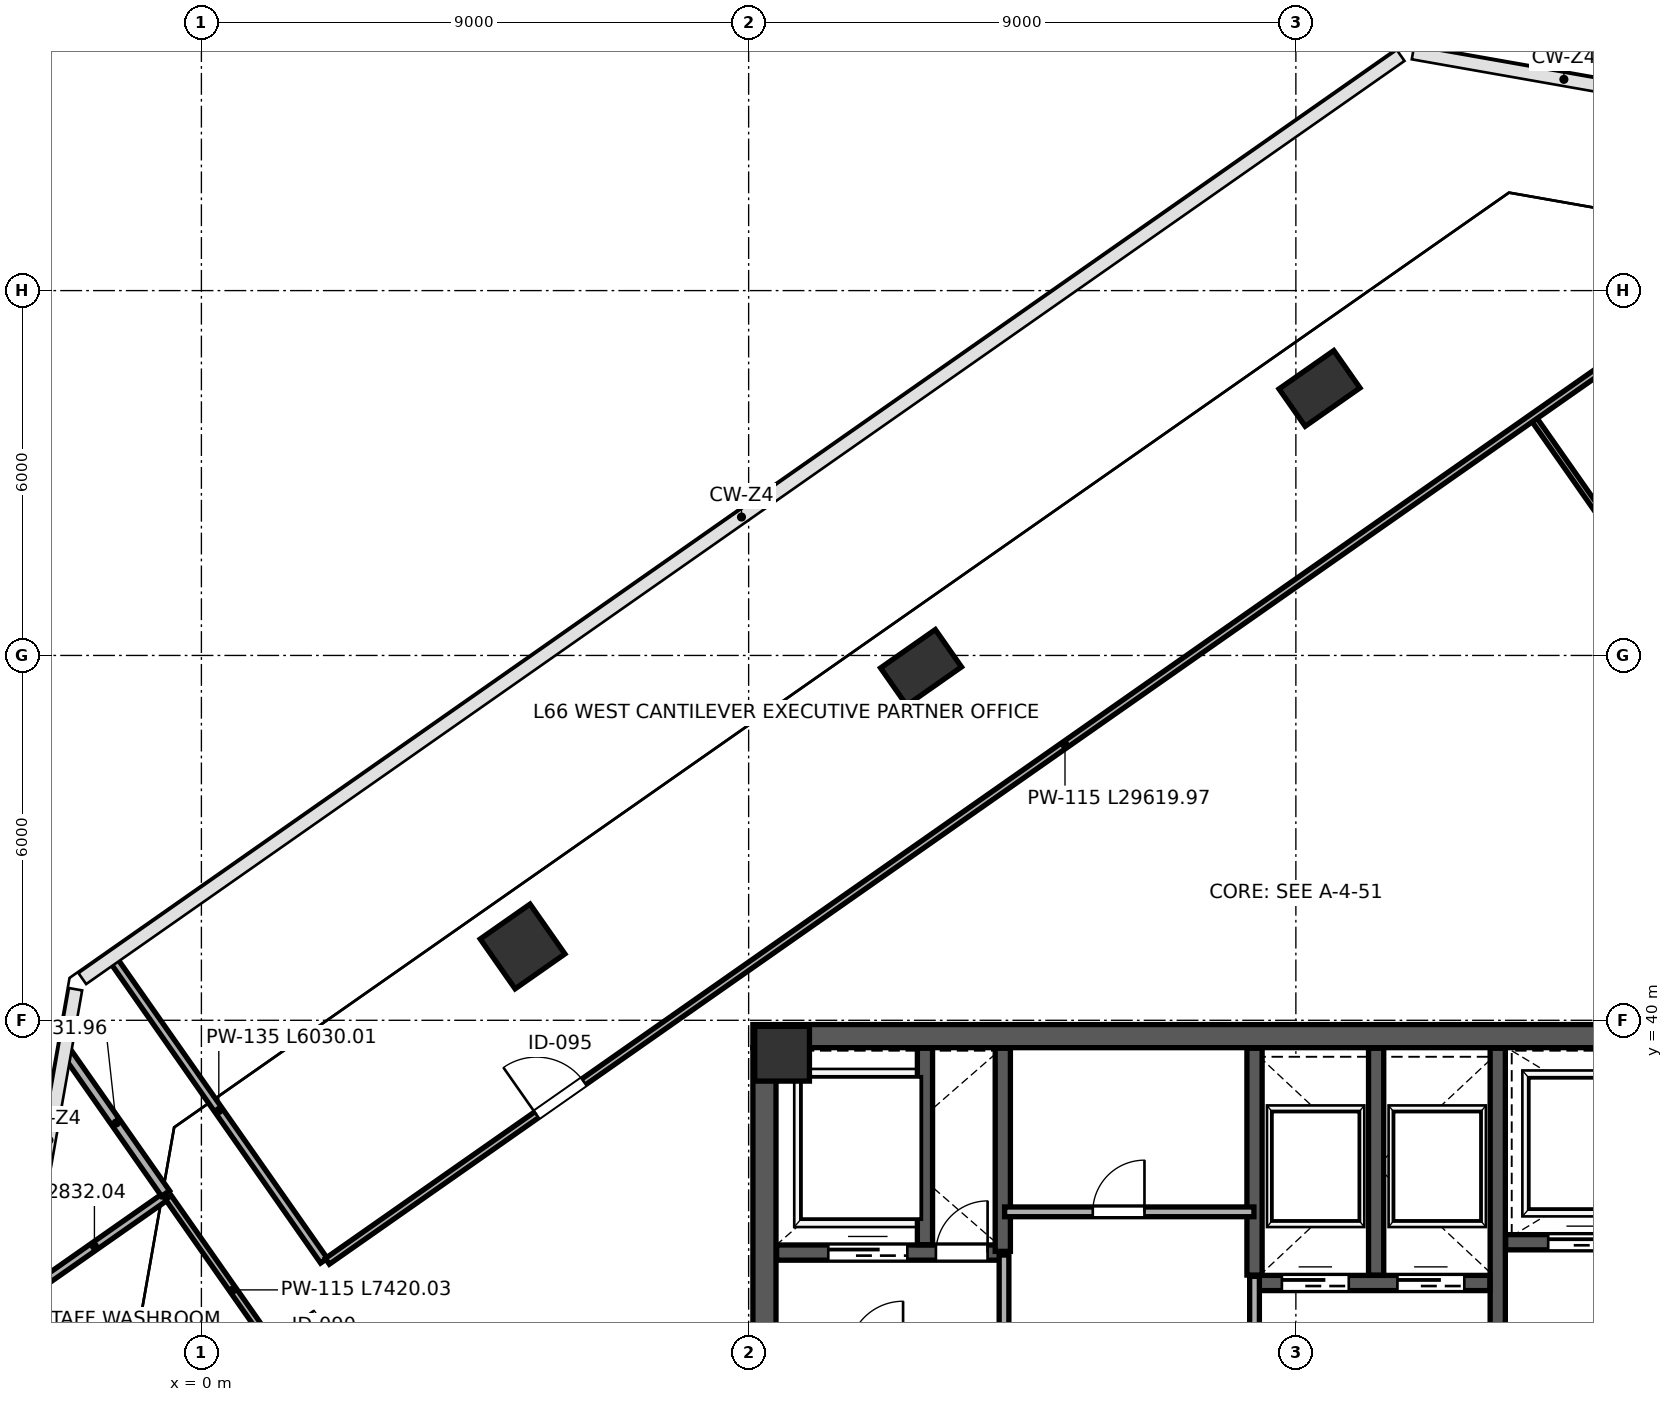
"""IFC4 building model, lengths in metres.
Left out: names, types, materials, properties, quantities, classifications, styles, units other than length and angle.
Written with IfcOpenShell. Run it as: python <this file> out.ifc"""

import sys

from ifc_helpers import new_model, si_unit, direction, frame, frame_2d, origin, origin_2d, place, context, subcontext, project, spatial, rectangle, extrude, source, transform, mapped, element, fill, save


model = new_model("IFC4")
c1 = context("Model", 3, precision=1e-05, world=origin(), true_north=direction((0.0, 1.0)))
c2 = subcontext(c1, "Body", "Model", "MODEL_VIEW")
j1 = project(units=[si_unit("LENGTHUNIT", "METRE"), si_unit("PLANEANGLEUNIT", "RADIAN")], contexts=[c1])
p1 = place(None, origin())
s1 = spatial("IfcSite", under=j1, at=p1, CompositionType="ELEMENT")
p2 = place(p1, origin())
s2 = spatial("IfcBuilding", under=s1, at=p2, CompositionType="ELEMENT")
p3 = place(p2, frame((0.0, 0.0, 293.8)))
s3 = spatial("IfcBuildingStorey", under=s2, at=p3, CompositionType="ELEMENT", Elevation=293.8)
m1 = source(origin(), c2, "Body", "SweptSolid", [
    extrude(rectangle(XDim=0.9, YDim=0.9, at=origin_2d()), origin(), (0.0, 0.0, 1.0), 4.999),
])
p4 = place(p3, frame((9.55, 39.45, 0.001), z_axis=(0.0, 0.0, 1.0), x_axis=(1.0, 0.0, 0.0)))
e1 = element("IfcColumn", 1, at=p4, inside=s3, PredefinedType="COLUMN", context=c2, shape_type="MappedRepresentation", body=[
    mapped(m1, transform((0.0, 0.0, 0.0), scale=1.0)),
])
m2 = source(origin(), c2, "Body", "SweptSolid", [
    extrude(rectangle(XDim=1.0, YDim=1.0, at=origin_2d()), origin(), (0.0, 0.0, 1.0), 4.999),
])
p5 = place(p3, frame((5.282, 41.214, 0.001), z_axis=(0.0, 0.0, 1.0), x_axis=(-0.573576436351, 0.819152044289, 0.0)))
e2 = element("IfcColumn", 2, at=p5, inside=s3, PredefinedType="COLUMN", context=c2, shape_type="MappedRepresentation", body=[
    mapped(m2, transform((0.0, 0.0, 0.0), scale=1.0)),
])
m3 = source(origin(), c2, "Body", "SweptSolid", [
    extrude(rectangle(XDim=0.75, YDim=1.1, at=origin_2d()), origin(), (0.0, 0.0, 1.0), 4.999),
])
for number, where, z_axis, x_axis in (
    (3, (11.835, 45.803, 0.001), (0.0, 0.0, 1.0), (-0.574, 0.819, 0.0)),
    (4, (18.388, 50.391, 0.001), (0.0, 0.0, 1.0), (-0.574, 0.819, 0.0)),
):
    element("IfcColumn", number, at=place(p3, frame(where, z_axis=z_axis, x_axis=x_axis)), inside=s3, PredefinedType="PILASTER", context=c2, shape_type="MappedRepresentation", body=[
        mapped(m3, transform((0.0, 0.0, 0.0), scale=1.0)),
    ])
p6 = place(p3, frame((9.26, 24.45, 0.0), z_axis=(0.0, 0.0, 1.0), x_axis=(0.0, 1.0, 0.0)))
e5 = element("IfcWall", 5, at=p6, inside=s3, PredefinedType="SHEAR", context=c2, shape_type="SweptSolid", body=[
    extrude(rectangle(XDim=15.1, YDim=0.38, at=frame_2d((7.55, 0.0))), origin(), (0.0, 0.0, 1.0), 4.76),
])
p7 = place(p6, frame((8.7, 0.0, 0.0)))
e6 = element("IfcOpeningElement", 6, at=p7, cuts=e5, PredefinedType="OPENING", context=c2, shape_type="SweptSolid", body=[
    extrude(rectangle(XDim=1.15, YDim=2.2, at=frame_2d((0.575, 1.1))), frame((0.0, 0.2, 0.0), z_axis=(0.0, -1.0, 0.0), x_axis=(1.0, 0.0, 0.0)), (0.0, 0.0, 1.0), 0.4),
])
p8 = place(p3, frame((9.07, 39.74, 0.0), z_axis=(0.0, 0.0, 1.0), x_axis=(1.0, 0.0, 0.0)))
e7 = element("IfcWall", 7, at=p8, inside=s3, PredefinedType="SHEAR", context=c2, shape_type="SweptSolid", body=[
    extrude(rectangle(XDim=17.86, YDim=0.38, at=frame_2d((8.93, 0.0))), origin(), (0.0, 0.0, 1.0), 4.76),
])
p9 = place(p3, frame((21.32, 32.12, 0.0), z_axis=(0.0, 0.0, 1.0), x_axis=(0.0, 1.0, 0.0)))
e8 = element("IfcWall", 8, at=p9, inside=s3, PredefinedType="SHEAR", context=c2, shape_type="SweptSolid", body=[
    extrude(rectangle(XDim=7.42, YDim=0.25, at=frame_2d((3.71, 0.0))), origin(), (0.0, 0.0, 1.0), 4.76),
])
p10 = place(p9, frame((1.4, 0.0, 0.0)))
e9 = element("IfcOpeningElement", 9, at=p10, cuts=e8, PredefinedType="OPENING", context=c2, shape_type="SweptSolid", body=[
    extrude(rectangle(XDim=1.15, YDim=2.2, at=frame_2d((0.575, 1.1))), frame((0.0, 0.135, 0.0), z_axis=(0.0, -1.0, 0.0), x_axis=(1.0, 0.0, 0.0)), (0.0, 0.0, 1.0), 0.27),
])
p11 = place(p3, frame((9.46, 36.18, 0.0), z_axis=(0.0, 0.0, 1.0), x_axis=(1.0, 0.0, 0.0)))
e10 = element("IfcWall", 10, at=p11, inside=s3, PredefinedType="SHEAR", context=c2, shape_type="SweptSolid", body=[
    extrude(rectangle(XDim=3.79, YDim=0.25, at=frame_2d((1.895, 0.0))), origin(), (0.0, 0.0, 1.0), 4.76),
])
p12 = place(p11, frame((2.62, 0.0, 0.0)))
e11 = element("IfcOpeningElement", 11, at=p12, cuts=e10, PredefinedType="OPENING", context=c2, shape_type="SweptSolid", body=[
    extrude(rectangle(XDim=0.85, YDim=2.1, at=frame_2d((0.425, 1.05))), frame((0.0, 0.135, 0.0), z_axis=(0.0, -1.0, 0.0), x_axis=(1.0, 0.0, 0.0)), (0.0, 0.0, 1.0), 0.27),
])
p13 = place(p11, frame((0.85, 0.0, 0.0)))
e12 = element("IfcOpeningElement", 12, at=p13, cuts=e10, PredefinedType="OPENING", context=c2, shape_type="SweptSolid", body=[
    extrude(rectangle(XDim=1.3, YDim=2.25, at=frame_2d((0.65, 1.125))), frame((0.0, 0.135, 0.0), z_axis=(0.0, -1.0, 0.0), x_axis=(1.0, 0.0, 0.0)), (0.0, 0.0, 1.0), 0.27),
])
p14 = place(p3, frame((11.9, 36.31, 0.0), z_axis=(0.0, 0.0, 1.0), x_axis=(0.0, 1.0, 0.0)))
e13 = element("IfcWall", 13, at=p14, inside=s3, PredefinedType="SHEAR", context=c2, shape_type="SweptSolid", body=[
    extrude(rectangle(XDim=3.23, YDim=0.25, at=frame_2d((1.615, 0.0))), origin(), (0.0, 0.0, 1.0), 4.76),
])
p15 = place(p3, frame((21.45, 36.35, 0.0), z_axis=(0.0, 0.0, 1.0), x_axis=(1.0, 0.0, 0.0)))
e14 = element("IfcWall", 14, at=p15, inside=s3, PredefinedType="SHEAR", context=c2, shape_type="SweptSolid", body=[
    extrude(rectangle(XDim=5.09, YDim=0.25, at=frame_2d((2.545, 0.0))), origin(), (0.0, 0.0, 1.0), 4.76),
])
p16 = place(p15, frame((0.7, 0.0, 0.0)))
e15 = element("IfcOpeningElement", 15, at=p16, cuts=e14, PredefinedType="OPENING", context=c2, shape_type="SweptSolid", body=[
    extrude(rectangle(XDim=1.2, YDim=2.2, at=frame_2d((0.6, 1.1))), frame((0.0, 0.135, 0.0), z_axis=(0.0, -1.0, 0.0), x_axis=(1.0, 0.0, 0.0)), (0.0, 0.0, 1.0), 0.27),
])
p17 = place(p15, frame((3.25, 0.0, 0.0)))
e16 = element("IfcOpeningElement", 16, at=p17, cuts=e14, PredefinedType="OPENING", context=c2, shape_type="SweptSolid", body=[
    extrude(rectangle(XDim=1.2, YDim=2.2, at=frame_2d((0.6, 1.1))), frame((0.0, 0.135, 0.0), z_axis=(0.0, -1.0, 0.0), x_axis=(1.0, 0.0, 0.0)), (0.0, 0.0, 1.0), 0.27),
])
p18 = place(p3, frame((13.18, 36.2, 0.0), z_axis=(0.0, 0.0, 1.0), x_axis=(0.0, 1.0, 0.0)))
e17 = element("IfcWall", 17, at=p18, inside=s3, PredefinedType="SHEAR", context=c2, shape_type="SweptSolid", body=[
    extrude(rectangle(XDim=3.34, YDim=0.25, at=frame_2d((1.67, 0.0))), origin(), (0.0, 0.0, 1.0), 4.76),
])
p19 = place(p3, frame((17.32, 35.68, 0.0), z_axis=(0.0, 0.0, 1.0), x_axis=(1.0, 0.0, 0.0)))
e18 = element("IfcWall", 18, at=p19, inside=s3, PredefinedType="SHEAR", context=c2, shape_type="SweptSolid", body=[
    extrude(rectangle(XDim=3.87, YDim=0.25, at=frame_2d((1.935, 0.0))), origin(), (0.0, 0.0, 1.0), 4.76),
])
p20 = place(p19, frame((0.45, 0.0, 0.0)))
e19 = element("IfcOpeningElement", 19, at=p20, cuts=e18, PredefinedType="OPENING", context=c2, shape_type="SweptSolid", body=[
    extrude(rectangle(XDim=1.1, YDim=2.2, at=frame_2d((0.55, 1.1))), frame((0.0, 0.135, 0.0), z_axis=(0.0, -1.0, 0.0), x_axis=(1.0, 0.0, 0.0)), (0.0, 0.0, 1.0), 0.27),
])
p21 = place(p19, frame((2.35, 0.0, 0.0)))
e20 = element("IfcOpeningElement", 20, at=p21, cuts=e18, PredefinedType="OPENING", context=c2, shape_type="SweptSolid", body=[
    extrude(rectangle(XDim=1.1, YDim=2.2, at=frame_2d((0.55, 1.1))), frame((0.0, 0.135, 0.0), z_axis=(0.0, -1.0, 0.0), x_axis=(1.0, 0.0, 0.0)), (0.0, 0.0, 1.0), 0.27),
])
for number, where, z_axis, x_axis in (
    (21, (17.32, 35.81, 0.0), (0.0, 0.0, 1.0), (0.0, 1.0, 0.0)),
    (22, (19.32, 35.81, 0.0), (0.0, 0.0, 1.0), (0.0, 1.0, 0.0)),
):
    element("IfcWall", number, at=place(p3, frame(where, z_axis=z_axis, x_axis=x_axis)), inside=s3, PredefinedType="SHEAR", context=c2, shape_type="SweptSolid", body=[
        extrude(rectangle(XDim=3.73, YDim=0.25, at=frame_2d((1.865, 0.0))), origin(), (0.0, 0.0, 1.0), 4.76),
    ])
p22 = place(p3, frame((13.2, 34.57, 0.0), z_axis=(0.0, 0.0, 1.0), x_axis=(0.0, 1.0, 0.0)))
e23 = element("IfcWall", 23, at=p22, inside=s3, PredefinedType="PARTITIONING", context=c2, shape_type="SweptSolid", body=[
    extrude(rectangle(XDim=1.57, YDim=0.16, at=frame_2d((0.785, 0.0))), origin(), (0.0, 0.0, 1.0), 4.76),
])
p23 = place(p3, frame((17.32, 33.86, 0.0), z_axis=(0.0, 0.0, 1.0), x_axis=(0.0, 1.0, 0.0)))
e24 = element("IfcWall", 24, at=p23, inside=s3, PredefinedType="PARTITIONING", context=c2, shape_type="SweptSolid", body=[
    extrude(rectangle(XDim=1.93, YDim=0.16, at=frame_2d((0.965, 0.0))), origin(), (0.0, 0.0, 1.0), 4.76),
])
p24 = place(p3, frame((13.21, 36.85, 0.0), z_axis=(0.0, 0.0, 1.0), x_axis=(1.0, 0.0, 0.0)))
e25 = element("IfcWall", 25, at=p24, inside=s3, PredefinedType="PARTITIONING", context=c2, shape_type="SweptSolid", body=[
    extrude(rectangle(XDim=4.1, YDim=0.16, at=frame_2d((2.05, 0.0))), origin(), (0.0, 0.0, 1.0), 4.76),
])
p25 = place(p24, frame((1.45, 0.0, 0.0)))
e26 = element("IfcOpeningElement", 26, at=p25, cuts=e25, PredefinedType="OPENING", context=c2, shape_type="SweptSolid", body=[
    extrude(rectangle(XDim=0.85, YDim=2.1, at=frame_2d((0.425, 1.05))), frame((0.0, 0.09, 0.0), z_axis=(0.0, -1.0, 0.0), x_axis=(1.0, 0.0, 0.0)), (0.0, 0.0, 1.0), 0.18),
])
p26 = place(p3, frame((-2.919, 35.471, 0.0), z_axis=(0.0, 0.0, 1.0), x_axis=(0.819098241059, 0.573653267657, 0.0)))
e27 = element("IfcWall", 27, at=p26, inside=s3, PredefinedType="PARTITIONING", context=c2, shape_type="SweptSolid", body=[
    extrude(rectangle(XDim=2.832, YDim=0.135, at=frame_2d((1.416, 0.0))), origin(), (0.0, 0.0, 1.0), 4.76),
])
p27 = place(p3, frame((-2.214, 39.471, 0.0), z_axis=(0.0, 0.0, 1.0), x_axis=(0.573653267657, -0.819098241059, 0.0)))
e28 = element("IfcWall", 28, at=p27, inside=s3, PredefinedType="PARTITIONING", context=c2, shape_type="SweptSolid", body=[
    extrude(rectangle(XDim=2.832, YDim=0.16, at=frame_2d((1.416, 0.0))), origin(), (0.0, 0.0, 1.0), 4.76),
])
p28 = place(p3, frame((-0.544, 37.086, 0.0), z_axis=(0.0, 0.0, 1.0), x_axis=(0.573568336404, -0.819157715873, 0.0)))
e29 = element("IfcWall", 29, at=p28, inside=s3, PredefinedType="PARTITIONING", context=c2, shape_type="SweptSolid", body=[
    extrude(rectangle(XDim=7.42, YDim=0.115, at=frame_2d((3.71, 0.0))), origin(), (0.0, 0.0, 1.0), 4.76),
])
p29 = place(p28, frame((2.9, 0.0, 0.0)))
e30 = element("IfcOpeningElement", 30, at=p29, cuts=e29, PredefinedType="OPENING", context=c2, shape_type="SweptSolid", body=[
    extrude(rectangle(XDim=0.9, YDim=2.15, at=frame_2d((0.45, 1.075))), frame((0.0, 0.067, 0.0), z_axis=(0.0, -1.0, 0.0), x_axis=(1.0, 0.0, 0.0)), (0.0, 0.0, 1.0), 0.135),
])
p30 = place(p28, frame((5.0, 0.0, 0.0)))
e31 = element("IfcOpeningElement", 31, at=p30, cuts=e29, PredefinedType="OPENING", context=c2, shape_type="SweptSolid", body=[
    extrude(rectangle(XDim=0.95, YDim=2.15, at=frame_2d((0.475, 1.075))), frame((0.0, 0.067, 0.0), z_axis=(0.0, -1.0, 0.0), x_axis=(1.0, 0.0, 0.0)), (0.0, 0.0, 1.0), 0.135),
])
p31 = place(p3, frame((21.918, 49.884, 0.0), z_axis=(0.0, 0.0, 1.0), x_axis=(0.57358495776, -0.819146077468, 0.0)))
e32 = element("IfcWall", 32, at=p31, inside=s3, PredefinedType="PARTITIONING", context=c2, shape_type="SweptSolid", body=[
    extrude(rectangle(XDim=25.79, YDim=0.1, at=frame_2d((12.895, 0.0))), origin(), (0.0, 0.0, 1.0), 4.76),
])
p32 = place(p31, frame((9.2, 0.0, 0.0)))
e33 = element("IfcOpeningElement", 33, at=p32, cuts=e32, PredefinedType="OPENING", context=c2, shape_type="SweptSolid", body=[
    extrude(rectangle(XDim=0.95, YDim=2.15, at=frame_2d((0.475, 1.075))), frame((0.0, 0.06, 0.0), z_axis=(0.0, -1.0, 0.0), x_axis=(1.0, 0.0, 0.0)), (0.0, 0.0, 1.0), 0.12),
])
p33 = place(p3, frame((-1.443, 40.985, 0.0), z_axis=(0.0, 0.0, 1.0), x_axis=(0.573587332855, -0.819144414367, 0.0)))
e34 = element("IfcWall", 34, at=p33, inside=s3, PredefinedType="PARTITIONING", context=c2, shape_type="SweptSolid", body=[
    extrude(rectangle(XDim=6.03, YDim=0.135, at=frame_2d((3.015, 0.0))), origin(), (0.0, 0.0, 1.0), 4.76),
])
p34 = place(p3, frame((2.071, 36.036, 0.0), z_axis=(0.0, 0.0, 1.0), x_axis=(0.819154854942, 0.573572422302, 0.0)))
e35 = element("IfcWall", 35, at=p34, inside=s3, PredefinedType="PARTITIONING", context=c2, shape_type="SweptSolid", body=[
    extrude(rectangle(XDim=29.62, YDim=0.115, at=frame_2d((14.81, 0.0))), origin(), (0.0, 0.0, 1.0), 4.76),
])
p35 = place(p34, frame((4.2, 0.0, 0.0)))
e36 = element("IfcOpeningElement", 36, at=p35, cuts=e35, PredefinedType="OPENING", context=c2, shape_type="SweptSolid", body=[
    extrude(rectangle(XDim=0.95, YDim=2.15, at=frame_2d((0.475, 1.075))), frame((0.0, 0.067, 0.0), z_axis=(0.0, -1.0, 0.0), x_axis=(1.0, 0.0, 0.0)), (0.0, 0.0, 1.0), 0.135),
])
m4 = source(origin(), c2, "Body", "SweptSolid", [
    extrude(rectangle(XDim=0.85, YDim=2.1, at=frame_2d((0.425, 1.05))), frame((0.0, 0.025, 0.0), z_axis=(0.0, -1.0, 0.0), x_axis=(1.0, 0.0, 0.0)), (0.0, 0.0, 1.0), 0.05),
])
p36 = place(p12, origin())
e37 = element("IfcDoor", 37, at=p36, inside=s3, OperationType="SINGLE_SWING_RIGHT", PredefinedType="DOOR", context=c2, shape_type="MappedRepresentation", body=[
    mapped(m4, transform((0.0, 0.0, 0.0), scale=1.0)),
])
fill(e11, e37)
m5 = source(origin(), c2, "Body", "SweptSolid", [
    extrude(rectangle(XDim=1.1, YDim=2.2, at=frame_2d((0.55, 1.1))), frame((0.0, 0.025, 0.0), z_axis=(0.0, -1.0, 0.0), x_axis=(1.0, 0.0, 0.0)), (0.0, 0.0, 1.0), 0.05),
])
p37 = place(p20, origin())
e38 = element("IfcDoor", 38, at=p37, inside=s3, OperationType="SLIDING_TO_LEFT", PredefinedType="DOOR", context=c2, shape_type="MappedRepresentation", body=[
    mapped(m5, transform((0.0, 0.0, 0.0), scale=1.0)),
])
fill(e19, e38)
p38 = place(p21, origin())
e39 = element("IfcDoor", 39, at=p38, inside=s3, OperationType="SLIDING_TO_RIGHT", PredefinedType="DOOR", context=c2, shape_type="MappedRepresentation", body=[
    mapped(m5, transform((0.0, 0.0, 0.0), scale=1.0)),
])
fill(e20, e39)
m6 = source(origin(), c2, "Body", "SweptSolid", [
    extrude(rectangle(XDim=1.2, YDim=2.2, at=frame_2d((0.6, 1.1))), frame((0.0, 0.025, 0.0), z_axis=(0.0, -1.0, 0.0), x_axis=(1.0, 0.0, 0.0)), (0.0, 0.0, 1.0), 0.05),
])
p39 = place(p16, origin())
e40 = element("IfcDoor", 40, at=p39, inside=s3, OperationType="SLIDING_TO_LEFT", PredefinedType="DOOR", context=c2, shape_type="MappedRepresentation", body=[
    mapped(m6, transform((0.0, 0.0, 0.0), scale=1.0)),
])
fill(e15, e40)
m7 = source(origin(), c2, "Body", "SweptSolid", [
    extrude(rectangle(XDim=1.3, YDim=2.25, at=frame_2d((0.65, 1.125))), frame((0.0, 0.025, 0.0), z_axis=(0.0, -1.0, 0.0), x_axis=(1.0, 0.0, 0.0)), (0.0, 0.0, 1.0), 0.05),
])
p40 = place(p13, origin())
e41 = element("IfcDoor", 41, at=p40, inside=s3, OperationType="SLIDING_TO_LEFT", PredefinedType="DOOR", context=c2, shape_type="MappedRepresentation", body=[
    mapped(m7, transform((0.0, 0.0, 0.0), scale=1.0)),
])
fill(e12, e41)
p41 = place(p25, origin())
e42 = element("IfcDoor", 42, at=p41, inside=s3, OperationType="SINGLE_SWING_RIGHT", PredefinedType="DOOR", context=c2, shape_type="MappedRepresentation", body=[
    mapped(m4, transform((0.0, 0.0, 0.0), scale=1.0)),
])
fill(e26, e42)
m8 = source(origin(), c2, "Body", "SweptSolid", [
    extrude(rectangle(XDim=0.95, YDim=2.15, at=frame_2d((0.475, 1.075))), frame((0.0, 0.025, 0.0), z_axis=(0.0, -1.0, 0.0), x_axis=(1.0, 0.0, 0.0)), (0.0, 0.0, 1.0), 0.05),
])
p42 = place(p35, origin())
e43 = element("IfcDoor", 43, at=p42, inside=s3, OperationType="SINGLE_SWING_LEFT", PredefinedType="DOOR", context=c2, shape_type="MappedRepresentation", body=[
    mapped(m8, transform((0.0, 0.0, 0.0), scale=1.0)),
])
fill(e36, e43)
save(model, sys.argv[1])
